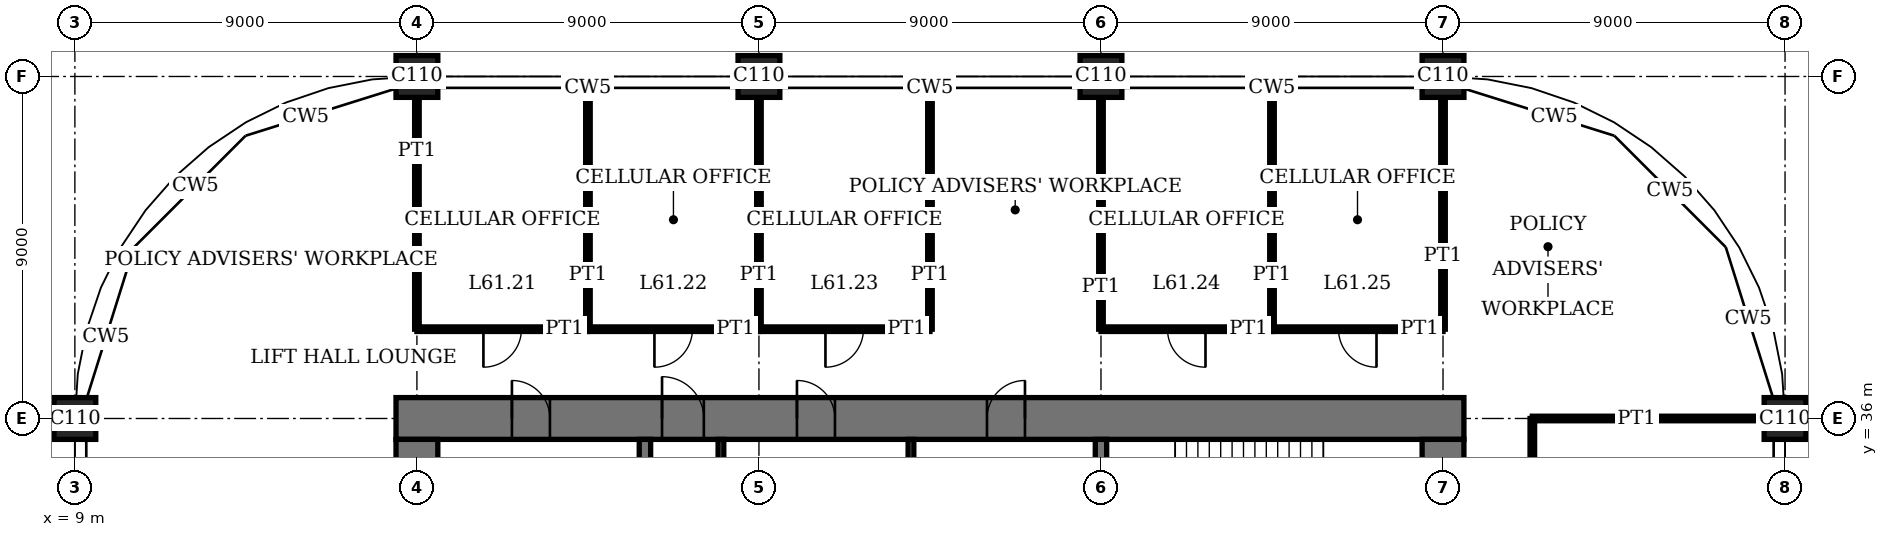
"""IFC4 building model, lengths in metres.
Left out: names, types, materials, properties, quantities, classifications, styles, units other than length and angle.
Written with IfcOpenShell. Run it as: python <this file> out.ifc"""

import sys

from ifc_helpers import new_model, si_unit, direction, frame, frame_2d, origin, origin_2d, place, context, subcontext, project, spatial, rectangle, extrude, element, fill, save


model = new_model("IFC4")
c1 = context("Model", 3, precision=1e-05, world=origin(), true_north=direction((0.0, 1.0)))
c2 = subcontext(c1, "Body", "Model", "MODEL_VIEW")
j1 = project(units=[si_unit("LENGTHUNIT", "METRE"), si_unit("PLANEANGLEUNIT", "RADIAN")], contexts=[c1])
p1 = place(None, origin())
s1 = spatial("IfcSite", under=j1, at=p1, CompositionType="ELEMENT")
p2 = place(p1, origin())
s2 = spatial("IfcBuilding", under=s1, at=p2, CompositionType="ELEMENT")
p3 = place(p2, frame((0.0, 0.0, 251.4)))
s3 = spatial("IfcBuildingStorey", under=s2, at=p3, CompositionType="ELEMENT", Elevation=251.4)
for number, where, z_axis, x_axis in (
    (1, (9.0, 36.0, 0.0), (0.0, 0.0, 1.0), (1.0, 0.0, 0.0)),
    (2, (18.0, 45.0, 0.0), (0.0, 0.0, 1.0), (1.0, 0.0, 0.0)),
    (3, (27.0, 45.0, 0.0), (0.0, 0.0, 1.0), (1.0, 0.0, 0.0)),
    (4, (36.0, 45.0, 0.0), (0.0, 0.0, 1.0), (1.0, 0.0, 0.0)),
    (5, (45.0, 45.0, 0.0), (0.0, 0.0, 1.0), (1.0, 0.0, 0.0)),
    (6, (54.0, 36.0, 0.0), (0.0, 0.0, 1.0), (1.0, 0.0, 0.0)),
):
    element("IfcColumn", number, at=place(p3, frame(where, z_axis=z_axis, x_axis=x_axis)), inside=s3, PredefinedType="COLUMN", context=c2, shape_type="SweptSolid", body=[
        extrude(rectangle(XDim=1.1, YDim=1.1, at=origin_2d()), origin(), (0.0, 0.0, 1.0), 4.0),
    ])
p4 = place(p3, frame((45.55, 36.0, 0.0), z_axis=(0.0, 0.0, 1.0), x_axis=(-1.0, 0.0, 0.0)))
e7 = element("IfcWall", 7, at=p4, inside=s3, PredefinedType="SHEAR", context=c2, shape_type="SweptSolid", body=[
    extrude(rectangle(XDim=28.1, YDim=1.1, at=frame_2d((14.05, 0.0))), origin(), (0.0, 0.0, 1.0), 4.0),
])
p5 = place(p4, frame((11.55, 0.0, 0.0)))
e8 = element("IfcOpeningElement", 8, at=p5, cuts=e7, PredefinedType="OPENING", context=c2, shape_type="SweptSolid", body=[
    extrude(rectangle(XDim=1.0, YDim=2.4, at=frame_2d((0.5, 1.2))), frame((0.0, 0.56, 0.0), z_axis=(0.0, -1.0, 0.0), x_axis=(1.0, 0.0, 0.0)), (0.0, 0.0, 1.0), 1.12),
])
p6 = place(p4, frame((16.55, 0.0, 0.0)))
e9 = element("IfcOpeningElement", 9, at=p6, cuts=e7, PredefinedType="OPENING", context=c2, shape_type="SweptSolid", body=[
    extrude(rectangle(XDim=1.0, YDim=2.4, at=frame_2d((0.5, 1.2))), frame((0.0, 0.56, 0.0), z_axis=(0.0, -1.0, 0.0), x_axis=(1.0, 0.0, 0.0)), (0.0, 0.0, 1.0), 1.12),
])
p7 = place(p4, frame((20.0, 0.0, 0.0)))
e10 = element("IfcOpeningElement", 10, at=p7, cuts=e7, PredefinedType="OPENING", context=c2, shape_type="SweptSolid", body=[
    extrude(rectangle(XDim=1.1, YDim=2.4, at=frame_2d((0.55, 1.2))), frame((0.0, 0.56, 0.0), z_axis=(0.0, -1.0, 0.0), x_axis=(1.0, 0.0, 0.0)), (0.0, 0.0, 1.0), 1.12),
])
p8 = place(p4, frame((24.05, 0.0, 0.0)))
e11 = element("IfcOpeningElement", 11, at=p8, cuts=e7, PredefinedType="OPENING", context=c2, shape_type="SweptSolid", body=[
    extrude(rectangle(XDim=1.0, YDim=2.4, at=frame_2d((0.5, 1.2))), frame((0.0, 0.56, 0.0), z_axis=(0.0, -1.0, 0.0), x_axis=(1.0, 0.0, 0.0)), (0.0, 0.0, 1.0), 1.12),
])
p9 = place(p3, frame((18.0, 35.45, 0.0), z_axis=(0.0, 0.0, 1.0), x_axis=(0.0, -1.0, 0.0)))
e12 = element("IfcWall", 12, at=p9, inside=s3, PredefinedType="SHEAR", context=c2, shape_type="SweptSolid", body=[
    extrude(rectangle(XDim=16.9, YDim=1.1, at=frame_2d((8.45, 0.0))), origin(), (0.0, 0.0, 1.0), 4.0),
])
p10 = place(p9, frame((8.45, 0.0, 0.0)))
e13 = element("IfcOpeningElement", 13, at=p10, cuts=e12, PredefinedType="OPENING", context=c2, shape_type="SweptSolid", body=[
    extrude(rectangle(XDim=1.8, YDim=2.4, at=frame_2d((0.9, 1.2))), frame((0.0, 0.56, 0.0), z_axis=(0.0, -1.0, 0.0), x_axis=(1.0, 0.0, 0.0)), (0.0, 0.0, 1.0), 1.12),
])
p11 = place(p3, frame((45.0, 18.55, 0.0), z_axis=(0.0, 0.0, 1.0), x_axis=(0.0, 1.0, 0.0)))
e14 = element("IfcWall", 14, at=p11, inside=s3, PredefinedType="SHEAR", context=c2, shape_type="SweptSolid", body=[
    extrude(rectangle(XDim=16.9, YDim=1.1, at=frame_2d((8.45, 0.0))), origin(), (0.0, 0.0, 1.0), 4.0),
])
p12 = place(p11, frame((8.45, 0.0, 0.0)))
e15 = element("IfcOpeningElement", 15, at=p12, cuts=e14, PredefinedType="OPENING", context=c2, shape_type="SweptSolid", body=[
    extrude(rectangle(XDim=1.8, YDim=2.4, at=frame_2d((0.9, 1.2))), frame((0.0, 0.56, 0.0), z_axis=(0.0, -1.0, 0.0), x_axis=(1.0, 0.0, 0.0)), (0.0, 0.0, 1.0), 1.12),
])
p13 = place(p3, frame((36.0, 32.4, 0.0), z_axis=(0.0, 0.0, 1.0), x_axis=(0.0, 1.0, 0.0)))
e16 = element("IfcWall", 16, at=p13, inside=s3, PredefinedType="SHEAR", context=c2, shape_type="SweptSolid", body=[
    extrude(rectangle(XDim=3.05, YDim=0.3, at=frame_2d((1.525, 0.0))), origin(), (0.0, 0.0, 1.0), 4.0),
])
p14 = place(p3, frame((24.0, 29.55, 0.0), z_axis=(0.0, 0.0, 1.0), x_axis=(0.0, 1.0, 0.0)))
e17 = element("IfcWall", 17, at=p14, inside=s3, PredefinedType="SHEAR", context=c2, shape_type="SweptSolid", body=[
    extrude(rectangle(XDim=5.9, YDim=0.3, at=frame_2d((2.95, 0.0))), origin(), (0.0, 0.0, 1.0), 4.0),
])
p15 = place(p3, frame((47.35, 36.0, 0.0), z_axis=(0.0, 0.0, 1.0), x_axis=(1.0, 0.0, 0.0)))
e18 = element("IfcWall", 18, at=p15, inside=s3, PredefinedType="PARTITIONING", context=c2, shape_type="SweptSolid", body=[
    extrude(rectangle(XDim=6.1, YDim=0.12, at=frame_2d((3.05, 0.0))), origin(), (0.0, 0.0, 1.0), 3.05),
])
p16 = place(p3, frame((18.0, 38.35, 0.0), z_axis=(0.0, 0.0, 1.0), x_axis=(1.0, 0.0, 0.0)))
e19 = element("IfcWall", 19, at=p16, inside=s3, PredefinedType="PARTITIONING", context=c2, shape_type="SweptSolid", body=[
    extrude(rectangle(XDim=4.5, YDim=0.12, at=frame_2d((2.25, 0.0))), origin(), (0.0, 0.0, 1.0), 3.75),
])
p17 = place(p16, frame((1.75, 0.0, 0.0)))
e20 = element("IfcOpeningElement", 20, at=p17, cuts=e19, PredefinedType="OPENING", context=c2, shape_type="SweptSolid", body=[
    extrude(rectangle(XDim=1.0, YDim=2.4, at=frame_2d((0.5, 1.2))), frame((0.0, 0.07, 0.0), z_axis=(0.0, -1.0, 0.0), x_axis=(1.0, 0.0, 0.0)), (0.0, 0.0, 1.0), 0.14),
])
p18 = place(p3, frame((22.5, 38.35, 0.0), z_axis=(0.0, 0.0, 1.0), x_axis=(1.0, 0.0, 0.0)))
e21 = element("IfcWall", 21, at=p18, inside=s3, PredefinedType="PARTITIONING", context=c2, shape_type="SweptSolid", body=[
    extrude(rectangle(XDim=4.5, YDim=0.12, at=frame_2d((2.25, 0.0))), origin(), (0.0, 0.0, 1.0), 3.75),
])
p19 = place(p18, frame((1.75, 0.0, 0.0)))
e22 = element("IfcOpeningElement", 22, at=p19, cuts=e21, PredefinedType="OPENING", context=c2, shape_type="SweptSolid", body=[
    extrude(rectangle(XDim=1.0, YDim=2.4, at=frame_2d((0.5, 1.2))), frame((0.0, 0.07, 0.0), z_axis=(0.0, -1.0, 0.0), x_axis=(1.0, 0.0, 0.0)), (0.0, 0.0, 1.0), 0.14),
])
p20 = place(p3, frame((27.0, 38.35, 0.0), z_axis=(0.0, 0.0, 1.0), x_axis=(1.0, 0.0, 0.0)))
e23 = element("IfcWall", 23, at=p20, inside=s3, PredefinedType="PARTITIONING", context=c2, shape_type="SweptSolid", body=[
    extrude(rectangle(XDim=4.5, YDim=0.12, at=frame_2d((2.25, 0.0))), origin(), (0.0, 0.0, 1.0), 3.75),
])
p21 = place(p20, frame((1.75, 0.0, 0.0)))
e24 = element("IfcOpeningElement", 24, at=p21, cuts=e23, PredefinedType="OPENING", context=c2, shape_type="SweptSolid", body=[
    extrude(rectangle(XDim=1.0, YDim=2.4, at=frame_2d((0.5, 1.2))), frame((0.0, 0.07, 0.0), z_axis=(0.0, -1.0, 0.0), x_axis=(1.0, 0.0, 0.0)), (0.0, 0.0, 1.0), 0.14),
])
p22 = place(p3, frame((36.0, 38.35, 0.0), z_axis=(0.0, 0.0, 1.0), x_axis=(1.0, 0.0, 0.0)))
e25 = element("IfcWall", 25, at=p22, inside=s3, PredefinedType="PARTITIONING", context=c2, shape_type="SweptSolid", body=[
    extrude(rectangle(XDim=4.5, YDim=0.12, at=frame_2d((2.25, 0.0))), origin(), (0.0, 0.0, 1.0), 3.75),
])
p23 = place(p22, frame((1.75, 0.0, 0.0)))
e26 = element("IfcOpeningElement", 26, at=p23, cuts=e25, PredefinedType="OPENING", context=c2, shape_type="SweptSolid", body=[
    extrude(rectangle(XDim=1.0, YDim=2.4, at=frame_2d((0.5, 1.2))), frame((0.0, 0.07, 0.0), z_axis=(0.0, -1.0, 0.0), x_axis=(1.0, 0.0, 0.0)), (0.0, 0.0, 1.0), 0.14),
])
p24 = place(p3, frame((40.5, 38.35, 0.0), z_axis=(0.0, 0.0, 1.0), x_axis=(1.0, 0.0, 0.0)))
e27 = element("IfcWall", 27, at=p24, inside=s3, PredefinedType="PARTITIONING", context=c2, shape_type="SweptSolid", body=[
    extrude(rectangle(XDim=4.5, YDim=0.12, at=frame_2d((2.25, 0.0))), origin(), (0.0, 0.0, 1.0), 3.75),
])
p25 = place(p24, frame((1.75, 0.0, 0.0)))
e28 = element("IfcOpeningElement", 28, at=p25, cuts=e27, PredefinedType="OPENING", context=c2, shape_type="SweptSolid", body=[
    extrude(rectangle(XDim=1.0, YDim=2.4, at=frame_2d((0.5, 1.2))), frame((0.0, 0.07, 0.0), z_axis=(0.0, -1.0, 0.0), x_axis=(1.0, 0.0, 0.0)), (0.0, 0.0, 1.0), 0.14),
])
p26 = place(p3, frame((18.0, 38.35, 0.0), z_axis=(0.0, 0.0, 1.0), x_axis=(0.0, 1.0, 0.0)))
e29 = element("IfcWall", 29, at=p26, inside=s3, PredefinedType="PARTITIONING", context=c2, shape_type="SweptSolid", body=[
    extrude(rectangle(XDim=6.1, YDim=0.12, at=frame_2d((3.05, 0.0))), origin(), (0.0, 0.0, 1.0), 3.05),
])
p27 = place(p3, frame((22.5, 38.35, 0.0), z_axis=(0.0, 0.0, 1.0), x_axis=(0.0, 1.0, 0.0)))
e30 = element("IfcWall", 30, at=p27, inside=s3, PredefinedType="PARTITIONING", context=c2, shape_type="SweptSolid", body=[
    extrude(rectangle(XDim=6.34, YDim=0.12, at=frame_2d((3.17, 0.0))), origin(), (0.0, 0.0, 1.0), 3.75),
])
p28 = place(p3, frame((27.0, 38.35, 0.0), z_axis=(0.0, 0.0, 1.0), x_axis=(0.0, 1.0, 0.0)))
e31 = element("IfcWall", 31, at=p28, inside=s3, PredefinedType="PARTITIONING", context=c2, shape_type="SweptSolid", body=[
    extrude(rectangle(XDim=6.1, YDim=0.12, at=frame_2d((3.05, 0.0))), origin(), (0.0, 0.0, 1.0), 3.05),
])
p29 = place(p3, frame((31.5, 38.35, 0.0), z_axis=(0.0, 0.0, 1.0), x_axis=(0.0, 1.0, 0.0)))
e32 = element("IfcWall", 32, at=p29, inside=s3, PredefinedType="PARTITIONING", context=c2, shape_type="SweptSolid", body=[
    extrude(rectangle(XDim=6.34, YDim=0.12, at=frame_2d((3.17, 0.0))), origin(), (0.0, 0.0, 1.0), 3.75),
])
p30 = place(p3, frame((36.0, 38.35, 0.0), z_axis=(0.0, 0.0, 1.0), x_axis=(0.0, 1.0, 0.0)))
e33 = element("IfcWall", 33, at=p30, inside=s3, PredefinedType="PARTITIONING", context=c2, shape_type="SweptSolid", body=[
    extrude(rectangle(XDim=6.1, YDim=0.12, at=frame_2d((3.05, 0.0))), origin(), (0.0, 0.0, 1.0), 3.05),
])
p31 = place(p3, frame((40.5, 38.35, 0.0), z_axis=(0.0, 0.0, 1.0), x_axis=(0.0, 1.0, 0.0)))
e34 = element("IfcWall", 34, at=p31, inside=s3, PredefinedType="PARTITIONING", context=c2, shape_type="SweptSolid", body=[
    extrude(rectangle(XDim=6.34, YDim=0.12, at=frame_2d((3.17, 0.0))), origin(), (0.0, 0.0, 1.0), 3.75),
])
p32 = place(p3, frame((45.0, 38.35, 0.0), z_axis=(0.0, 0.0, 1.0), x_axis=(0.0, 1.0, 0.0)))
e35 = element("IfcWall", 35, at=p32, inside=s3, PredefinedType="PARTITIONING", context=c2, shape_type="SweptSolid", body=[
    extrude(rectangle(XDim=6.1, YDim=0.12, at=frame_2d((3.05, 0.0))), origin(), (0.0, 0.0, 1.0), 3.05),
])
p33 = place(p3, frame((47.35, 27.0, 0.0), z_axis=(0.0, 0.0, 1.0), x_axis=(0.0, 1.0, 0.0)))
e36 = element("IfcWall", 36, at=p33, inside=s3, PredefinedType="PARTITIONING", context=c2, shape_type="SweptSolid", body=[
    extrude(rectangle(XDim=9.0, YDim=0.12, at=frame_2d((4.5, 0.0))), origin(), (0.0, 0.0, 1.0), 3.75),
])
p34 = place(p33, frame((4.0, 0.0, 0.0)))
e37 = element("IfcOpeningElement", 37, at=p34, cuts=e36, PredefinedType="OPENING", context=c2, shape_type="SweptSolid", body=[
    extrude(rectangle(XDim=1.0, YDim=2.4, at=frame_2d((0.5, 1.2))), frame((0.0, 0.07, 0.0), z_axis=(0.0, -1.0, 0.0), x_axis=(1.0, 0.0, 0.0)), (0.0, 0.0, 1.0), 0.14),
])
for number, where, z_axis, x_axis in (
    (38, (31.0, 32.55, 0.0), (0.0, 0.0, 1.0), (0.0, 1.0, 0.0)),
    (39, (26.0, 32.55, 0.0), (0.0, 0.0, 1.0), (0.0, 1.0, 0.0)),
):
    element("IfcWall", number, at=place(p3, frame(where, z_axis=z_axis, x_axis=x_axis)), inside=s3, PredefinedType="PARTITIONING", context=c2, shape_type="SweptSolid", body=[
        extrude(rectangle(XDim=2.9, YDim=0.15, at=frame_2d((1.45, 0.0))), origin(), (0.0, 0.0, 1.0), 3.75),
    ])
p35 = place(p5, origin())
e40 = element("IfcDoor", 40, at=p35, inside=s3, OperationType="SINGLE_SWING_LEFT", PredefinedType="DOOR", context=c2, shape_type="SweptSolid", body=[
    extrude(rectangle(XDim=1.0, YDim=2.4, at=frame_2d((0.5, 1.2))), frame((0.0, 0.025, 0.0), z_axis=(0.0, -1.0, 0.0), x_axis=(1.0, 0.0, 0.0)), (0.0, 0.0, 1.0), 0.05),
    extrude(rectangle(XDim=0.04, YDim=2.4, at=frame_2d((0.02, 1.2))), frame((0.0, 0.4, 0.0), z_axis=(0.0, -1.0, 0.0), x_axis=(1.0, 0.0, 0.0)), (0.0, 0.0, 1.0), 0.8),
    extrude(rectangle(XDim=0.04, YDim=2.4, at=frame_2d((0.98, 1.2))), frame((0.0, 0.4, 0.0), z_axis=(0.0, -1.0, 0.0), x_axis=(1.0, 0.0, 0.0)), (0.0, 0.0, 1.0), 0.8),
    extrude(rectangle(XDim=1.0, YDim=0.04, at=frame_2d((0.5, 2.38))), frame((0.0, 0.4, 0.0), z_axis=(0.0, -1.0, 0.0), x_axis=(1.0, 0.0, 0.0)), (0.0, 0.0, 1.0), 0.8),
])
fill(e8, e40)
p36 = place(p6, origin())
e41 = element("IfcDoor", 41, at=p36, inside=s3, OperationType="SINGLE_SWING_RIGHT", PredefinedType="DOOR", context=c2, shape_type="SweptSolid", body=[
    extrude(rectangle(XDim=1.0, YDim=2.4, at=frame_2d((0.5, 1.2))), frame((0.0, 0.025, 0.0), z_axis=(0.0, -1.0, 0.0), x_axis=(1.0, 0.0, 0.0)), (0.0, 0.0, 1.0), 0.05),
    extrude(rectangle(XDim=0.04, YDim=2.4, at=frame_2d((0.02, 1.2))), frame((0.0, 0.4, 0.0), z_axis=(0.0, -1.0, 0.0), x_axis=(1.0, 0.0, 0.0)), (0.0, 0.0, 1.0), 0.8),
    extrude(rectangle(XDim=0.04, YDim=2.4, at=frame_2d((0.98, 1.2))), frame((0.0, 0.4, 0.0), z_axis=(0.0, -1.0, 0.0), x_axis=(1.0, 0.0, 0.0)), (0.0, 0.0, 1.0), 0.8),
    extrude(rectangle(XDim=1.0, YDim=0.04, at=frame_2d((0.5, 2.38))), frame((0.0, 0.4, 0.0), z_axis=(0.0, -1.0, 0.0), x_axis=(1.0, 0.0, 0.0)), (0.0, 0.0, 1.0), 0.8),
])
fill(e9, e41)
p37 = place(p7, origin())
e42 = element("IfcDoor", 42, at=p37, inside=s3, OperationType="SINGLE_SWING_RIGHT", PredefinedType="DOOR", context=c2, shape_type="SweptSolid", body=[
    extrude(rectangle(XDim=1.1, YDim=2.4, at=frame_2d((0.55, 1.2))), frame((0.0, 0.025, 0.0), z_axis=(0.0, -1.0, 0.0), x_axis=(1.0, 0.0, 0.0)), (0.0, 0.0, 1.0), 0.05),
    extrude(rectangle(XDim=0.04, YDim=2.4, at=frame_2d((0.02, 1.2))), frame((0.0, 0.44, 0.0), z_axis=(0.0, -1.0, 0.0), x_axis=(1.0, 0.0, 0.0)), (0.0, 0.0, 1.0), 0.88),
    extrude(rectangle(XDim=0.04, YDim=2.4, at=frame_2d((1.08, 1.2))), frame((0.0, 0.44, 0.0), z_axis=(0.0, -1.0, 0.0), x_axis=(1.0, 0.0, 0.0)), (0.0, 0.0, 1.0), 0.88),
    extrude(rectangle(XDim=1.1, YDim=0.04, at=frame_2d((0.55, 2.38))), frame((0.0, 0.44, 0.0), z_axis=(0.0, -1.0, 0.0), x_axis=(1.0, 0.0, 0.0)), (0.0, 0.0, 1.0), 0.88),
])
fill(e10, e42)
p38 = place(p8, origin())
e43 = element("IfcDoor", 43, at=p38, inside=s3, OperationType="SINGLE_SWING_RIGHT", PredefinedType="DOOR", context=c2, shape_type="SweptSolid", body=[
    extrude(rectangle(XDim=1.0, YDim=2.4, at=frame_2d((0.5, 1.2))), frame((0.0, 0.025, 0.0), z_axis=(0.0, -1.0, 0.0), x_axis=(1.0, 0.0, 0.0)), (0.0, 0.0, 1.0), 0.05),
    extrude(rectangle(XDim=0.04, YDim=2.4, at=frame_2d((0.02, 1.2))), frame((0.0, 0.4, 0.0), z_axis=(0.0, -1.0, 0.0), x_axis=(1.0, 0.0, 0.0)), (0.0, 0.0, 1.0), 0.8),
    extrude(rectangle(XDim=0.04, YDim=2.4, at=frame_2d((0.98, 1.2))), frame((0.0, 0.4, 0.0), z_axis=(0.0, -1.0, 0.0), x_axis=(1.0, 0.0, 0.0)), (0.0, 0.0, 1.0), 0.8),
    extrude(rectangle(XDim=1.0, YDim=0.04, at=frame_2d((0.5, 2.38))), frame((0.0, 0.4, 0.0), z_axis=(0.0, -1.0, 0.0), x_axis=(1.0, 0.0, 0.0)), (0.0, 0.0, 1.0), 0.8),
])
fill(e11, e43)
p39 = place(p17, origin())
e44 = element("IfcDoor", 44, at=p39, inside=s3, OperationType="SINGLE_SWING_LEFT", PredefinedType="DOOR", context=c2, shape_type="SweptSolid", body=[
    extrude(rectangle(XDim=1.0, YDim=2.4, at=frame_2d((0.5, 1.2))), frame((0.0, 0.025, 0.0), z_axis=(0.0, -1.0, 0.0), x_axis=(1.0, 0.0, 0.0)), (0.0, 0.0, 1.0), 0.05),
])
fill(e20, e44)
p40 = place(p19, origin())
e45 = element("IfcDoor", 45, at=p40, inside=s3, OperationType="SINGLE_SWING_LEFT", PredefinedType="DOOR", context=c2, shape_type="SweptSolid", body=[
    extrude(rectangle(XDim=1.0, YDim=2.4, at=frame_2d((0.5, 1.2))), frame((0.0, 0.025, 0.0), z_axis=(0.0, -1.0, 0.0), x_axis=(1.0, 0.0, 0.0)), (0.0, 0.0, 1.0), 0.05),
])
fill(e22, e45)
p41 = place(p21, origin())
e46 = element("IfcDoor", 46, at=p41, inside=s3, OperationType="SINGLE_SWING_LEFT", PredefinedType="DOOR", context=c2, shape_type="SweptSolid", body=[
    extrude(rectangle(XDim=1.0, YDim=2.4, at=frame_2d((0.5, 1.2))), frame((0.0, 0.025, 0.0), z_axis=(0.0, -1.0, 0.0), x_axis=(1.0, 0.0, 0.0)), (0.0, 0.0, 1.0), 0.05),
])
fill(e24, e46)
p42 = place(p23, origin())
e47 = element("IfcDoor", 47, at=p42, inside=s3, OperationType="SINGLE_SWING_RIGHT", PredefinedType="DOOR", context=c2, shape_type="SweptSolid", body=[
    extrude(rectangle(XDim=1.0, YDim=2.4, at=frame_2d((0.5, 1.2))), frame((0.0, 0.025, 0.0), z_axis=(0.0, -1.0, 0.0), x_axis=(1.0, 0.0, 0.0)), (0.0, 0.0, 1.0), 0.05),
])
fill(e26, e47)
p43 = place(p25, origin())
e48 = element("IfcDoor", 48, at=p43, inside=s3, OperationType="SINGLE_SWING_RIGHT", PredefinedType="DOOR", context=c2, shape_type="SweptSolid", body=[
    extrude(rectangle(XDim=1.0, YDim=2.4, at=frame_2d((0.5, 1.2))), frame((0.0, 0.025, 0.0), z_axis=(0.0, -1.0, 0.0), x_axis=(1.0, 0.0, 0.0)), (0.0, 0.0, 1.0), 0.05),
])
fill(e28, e48)
save(model, sys.argv[1])
